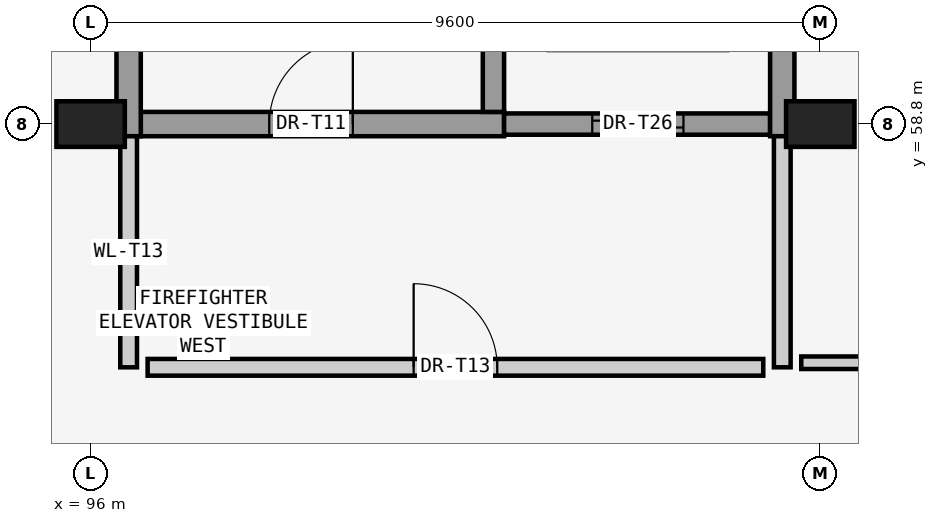
"""IFC4 building model, lengths in metres.
Left out: names, types, materials, properties, quantities, classifications, styles, units other than length and angle.
Written with IfcOpenShell. Run it as: python <this file> out.ifc"""

import sys

from ifc_helpers import new_model, si_unit, direction, frame, frame_2d, origin, origin_2d, place, context, subcontext, project, spatial, rectangle, extrude, element, fill, save


model = new_model("IFC4")
c1 = context("Model", 3, precision=1e-05, world=origin(), true_north=direction((0.0, 1.0)))
c2 = subcontext(c1, "Body", "Model", "MODEL_VIEW")
j1 = project(units=[si_unit("LENGTHUNIT", "METRE"), si_unit("PLANEANGLEUNIT", "RADIAN")], contexts=[c1])
p1 = place(None, origin())
s1 = spatial("IfcSite", under=j1, at=p1, CompositionType="ELEMENT")
p2 = place(p1, origin())
s2 = spatial("IfcBuilding", under=s1, at=p2, CompositionType="ELEMENT")
p3 = place(p2, frame((0.0, 0.0, -9.6)))
s3 = spatial("IfcBuildingStorey", under=s2, at=p3, CompositionType="ELEMENT", Elevation=-9.6)
for number, where, z_axis, x_axis in (
    (1, (96.0, 58.8, 0.0), (0.0, 0.0, 1.0), (1.0, 0.0, 0.0)),
    (2, (105.6, 58.8, 0.0), (0.0, 0.0, 1.0), (1.0, 0.0, 0.0)),
):
    element("IfcColumn", number, at=place(p3, frame(where, z_axis=z_axis, x_axis=x_axis)), inside=s3, PredefinedType="COLUMN", context=c2, shape_type="SweptSolid", body=[
        extrude(rectangle(XDim=0.9, YDim=0.6, at=origin_2d()), origin(), (0.0, 0.0, 1.0), 4.4),
    ])
p4 = place(p3, frame((96.66, 58.8, 0.0), z_axis=(0.0, 0.0, 1.0), x_axis=(1.0, 0.0, 0.0)))
e3 = element("IfcWall", 3, at=p4, inside=s3, PredefinedType="SHEAR", context=c2, shape_type="SweptSolid", body=[
    extrude(rectangle(XDim=4.78, YDim=0.32, at=frame_2d((2.39, 0.0))), origin(), (0.0, 0.0, 1.0), 4.38),
])
p5 = place(p4, frame((1.69, 0.0, 0.0)))
e4 = element("IfcOpeningElement", 4, at=p5, cuts=e3, PredefinedType="OPENING", context=c2, shape_type="SweptSolid", body=[
    extrude(rectangle(XDim=1.1, YDim=2.2, at=frame_2d((0.55, 1.1))), frame((0.0, 0.17, 0.0), z_axis=(0.0, -1.0, 0.0), x_axis=(1.0, 0.0, 0.0)), (0.0, 0.0, 1.0), 0.34),
])
p6 = place(p3, frame((101.44, 58.8, 0.0), z_axis=(0.0, 0.0, 1.0), x_axis=(1.0, 0.0, 0.0)))
e5 = element("IfcWall", 5, at=p6, inside=s3, PredefinedType="SHEAR", context=c2, shape_type="SweptSolid", body=[
    extrude(rectangle(XDim=3.5, YDim=0.28, at=frame_2d((1.75, 0.0))), origin(), (0.0, 0.0, 1.0), 4.38),
])
p7 = place(p6, frame((1.16, 0.0, 0.0)))
e6 = element("IfcOpeningElement", 6, at=p7, cuts=e5, PredefinedType="OPENING", context=c2, shape_type="SweptSolid", body=[
    extrude(rectangle(XDim=1.2, YDim=2.2, at=frame_2d((0.6, 1.1))), frame((0.0, 0.15, 0.0), z_axis=(0.0, -1.0, 0.0), x_axis=(1.0, 0.0, 0.0)), (0.0, 0.0, 1.0), 0.3),
])
for number, where, z_axis, x_axis in (
    (7, (96.5, 67.0, 0.0), (0.0, 0.0, 1.0), (0.0, -1.0, 0.0)),
    (8, (105.1, 58.64, 0.0), (0.0, 0.0, 1.0), (0.0, 1.0, 0.0)),
):
    element("IfcWall", number, at=place(p3, frame(where, z_axis=z_axis, x_axis=x_axis)), inside=s3, PredefinedType="SHEAR", context=c2, shape_type="SweptSolid", body=[
        extrude(rectangle(XDim=8.36, YDim=0.32, at=frame_2d((4.18, 0.0))), origin(), (0.0, 0.0, 1.0), 4.38),
    ])
p8 = place(p3, frame((101.3, 58.96, 0.0), z_axis=(0.0, 0.0, 1.0), x_axis=(0.0, 1.0, 0.0)))
e9 = element("IfcWall", 9, at=p8, inside=s3, PredefinedType="SHEAR", context=c2, shape_type="SweptSolid", body=[
    extrude(rectangle(XDim=7.72, YDim=0.28, at=frame_2d((3.86, 0.0))), origin(), (0.0, 0.0, 1.0), 4.38),
])
for number, where, z_axis, x_axis in (
    (10, (96.5, 55.6, 0.0), (0.0, 0.0, 1.0), (0.0, 1.0, 0.0)),
    (11, (105.1, 55.6, 0.0), (0.0, 0.0, 1.0), (0.0, 1.0, 0.0)),
):
    element("IfcWall", number, at=place(p3, frame(where, z_axis=z_axis, x_axis=x_axis)), inside=s3, PredefinedType="SOLIDWALL", context=c2, shape_type="SweptSolid", body=[
        extrude(rectangle(XDim=3.04, YDim=0.22, at=frame_2d((1.52, 0.0))), origin(), (0.0, 0.0, 1.0), 4.32),
    ])
p9 = place(p3, frame((96.75, 55.6, 0.0), z_axis=(0.0, 0.0, 1.0), x_axis=(1.0, 0.0, 0.0)))
e12 = element("IfcWall", 12, at=p9, inside=s3, PredefinedType="SOLIDWALL", context=c2, shape_type="SweptSolid", body=[
    extrude(rectangle(XDim=8.1, YDim=0.22, at=frame_2d((4.05, 0.0))), origin(), (0.0, 0.0, 1.0), 4.32),
])
p10 = place(p9, frame((3.5, 0.0, 0.0)))
e13 = element("IfcOpeningElement", 13, at=p10, cuts=e12, PredefinedType="OPENING", context=c2, shape_type="SweptSolid", body=[
    extrude(rectangle(XDim=1.1, YDim=2.2, at=frame_2d((0.55, 1.1))), frame((0.0, 0.12, 0.0), z_axis=(0.0, -1.0, 0.0), x_axis=(1.0, 0.0, 0.0)), (0.0, 0.0, 1.0), 0.24),
])
p11 = place(p3, frame((105.35, 55.66, 0.0), z_axis=(0.0, 0.0, 1.0), x_axis=(1.0, 0.0, 0.0)))
e14 = element("IfcWall", 14, at=p11, inside=s3, PredefinedType="PARTITIONING", context=c2, shape_type="SweptSolid", body=[
    extrude(rectangle(XDim=11.05, YDim=0.165, at=frame_2d((5.525, 0.0))), origin(), (0.0, 0.0, 1.0), 4.35),
])
p12 = place(p5, origin())
e15 = element("IfcDoor", 15, at=p12, inside=s3, OperationType="SINGLE_SWING_RIGHT", PredefinedType="DOOR", context=c2, shape_type="SweptSolid", body=[
    extrude(rectangle(XDim=1.1, YDim=2.2, at=frame_2d((0.55, 1.1))), frame((0.0, 0.025, 0.0), z_axis=(0.0, -1.0, 0.0), x_axis=(1.0, 0.0, 0.0)), (0.0, 0.0, 1.0), 0.05),
])
fill(e4, e15)
p13 = place(p7, origin())
e16 = element("IfcDoor", 16, at=p13, inside=s3, OperationType="SLIDING_TO_RIGHT", PredefinedType="DOOR", context=c2, shape_type="SweptSolid", body=[
    extrude(rectangle(XDim=1.2, YDim=2.2, at=frame_2d((0.6, 1.1))), frame((0.0, 0.025, 0.0), z_axis=(0.0, -1.0, 0.0), x_axis=(1.0, 0.0, 0.0)), (0.0, 0.0, 1.0), 0.05),
])
fill(e6, e16)
p14 = place(p10, origin())
e17 = element("IfcDoor", 17, at=p14, inside=s3, OperationType="SINGLE_SWING_LEFT", PredefinedType="DOOR", context=c2, shape_type="SweptSolid", body=[
    extrude(rectangle(XDim=1.1, YDim=2.2, at=frame_2d((0.55, 1.1))), frame((0.0, 0.025, 0.0), z_axis=(0.0, -1.0, 0.0), x_axis=(1.0, 0.0, 0.0)), (0.0, 0.0, 1.0), 0.05),
])
fill(e13, e17)
save(model, sys.argv[1])
